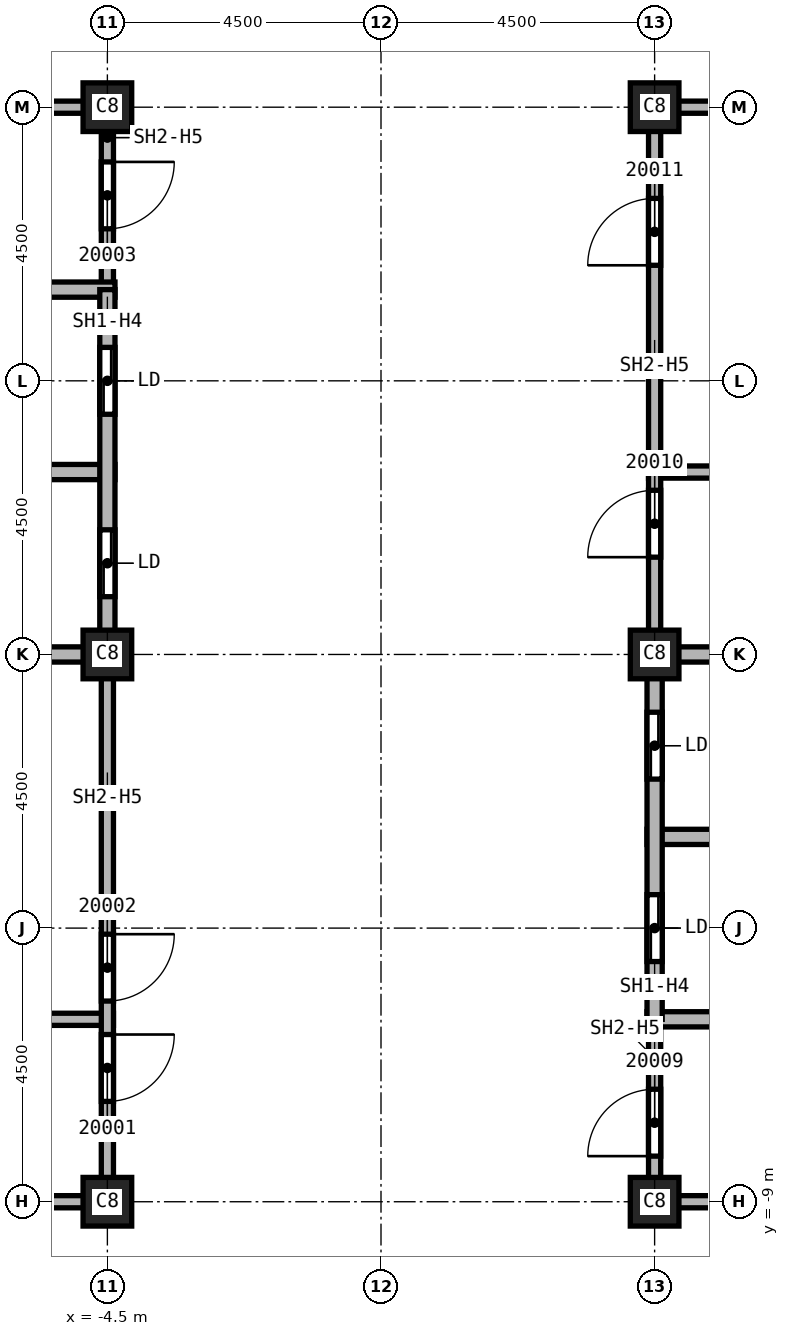
"""IFC4 building model, lengths in metres.
Left out: names, types, materials, properties, quantities, classifications, styles, units other than length and angle.
Written with IfcOpenShell. Run it as: python <this file> out.ifc"""

import sys

from ifc_helpers import new_model, si_unit, direction, frame, frame_2d, origin, origin_2d, place, context, subcontext, project, spatial, rectangle, extrude, element, fill, save


model = new_model("IFC4")
c1 = context("Model", 3, precision=1e-05, world=origin(), true_north=direction((0.0, 1.0)))
c2 = subcontext(c1, "Body", "Model", "MODEL_VIEW")
j1 = project(units=[si_unit("LENGTHUNIT", "METRE"), si_unit("PLANEANGLEUNIT", "RADIAN")], contexts=[c1])
p1 = place(None, origin())
s1 = spatial("IfcSite", under=j1, at=p1, CompositionType="ELEMENT")
p2 = place(p1, origin())
s2 = spatial("IfcBuilding", under=s1, at=p2, CompositionType="ELEMENT")
p3 = place(p2, frame((0.0, 0.0, 290.0)))
s3 = spatial("IfcBuildingStorey", under=s2, at=p3, CompositionType="ELEMENT", Elevation=290.0)
for number, where, z_axis, x_axis in (
    (1, (4.5, 0.0, 0.0), (0.0, 0.0, 1.0), (1.0, 0.0, 0.0)),
    (2, (4.5, 9.0, 0.0), (0.0, 0.0, 1.0), (1.0, 0.0, 0.0)),
    (3, (4.5, -9.0, 0.0), (0.0, 0.0, 1.0), (1.0, 0.0, 0.0)),
    (4, (-4.5, 0.0, 0.0), (0.0, 0.0, 1.0), (1.0, 0.0, 0.0)),
    (5, (-4.5, 9.0, 0.0), (0.0, 0.0, 1.0), (1.0, 0.0, 0.0)),
    (6, (-4.5, -9.0, 0.0), (0.0, 0.0, 1.0), (1.0, 0.0, 0.0)),
):
    element("IfcColumn", number, at=place(p3, frame(where, z_axis=z_axis, x_axis=x_axis)), inside=s3, PredefinedType="COLUMN", context=c2, shape_type="SweptSolid", body=[
        extrude(rectangle(XDim=0.8, YDim=0.8, at=origin_2d()), origin(), (0.0, 0.0, 1.0), 3.59),
    ])
p4 = place(p3, frame((-7.6, -6.0, 0.0), z_axis=(0.0, 0.0, 1.0), x_axis=(1.0, 0.0, 0.0)))
e7 = element("IfcWall", 7, at=p4, inside=s3, PredefinedType="SOLIDWALL", context=c2, shape_type="SweptSolid", body=[
    extrude(rectangle(XDim=3.2, YDim=0.2, at=frame_2d((1.6, 0.0))), origin(), (0.0, 0.0, 1.0), 3.59),
])
for number, where, z_axis, x_axis in (
    (8, (-7.5, 9.0, 0.0), (0.0, 0.0, 1.0), (1.0, 0.0, 0.0)),
    (9, (-4.5, -9.0, 0.0), (0.0, 0.0, 1.0), (-1.0, 0.0, 0.0)),
):
    element("IfcWall", number, at=place(p3, frame(where, z_axis=z_axis, x_axis=x_axis)), inside=s3, PredefinedType="SOLIDWALL", context=c2, shape_type="SweptSolid", body=[
        extrude(rectangle(XDim=3.0, YDim=0.2, at=frame_2d((1.5, 0.0))), origin(), (0.0, 0.0, 1.0), 2.828),
    ])
p5 = place(p3, frame((-4.5, 0.0, 0.0), z_axis=(0.0, 0.0, 1.0), x_axis=(0.0, -1.0, 0.0)))
e10 = element("IfcWall", 10, at=p5, inside=s3, PredefinedType="SOLIDWALL", context=c2, shape_type="SweptSolid", body=[
    extrude(rectangle(XDim=9.1, YDim=0.2, at=frame_2d((4.55, 0.0))), origin(), (0.0, 0.0, 1.0), 2.828),
])
p6 = place(p5, frame((6.25, 0.0, 0.0)))
e11 = element("IfcOpeningElement", 11, at=p6, cuts=e10, PredefinedType="OPENING", context=c2, shape_type="SweptSolid", body=[
    extrude(rectangle(XDim=1.1, YDim=2.1, at=frame_2d((0.55, 1.05))), frame((0.0, 0.1, 0.0), z_axis=(0.0, -1.0, 0.0), x_axis=(1.0, 0.0, 0.0)), (0.0, 0.0, 1.0), 0.2),
])
p7 = place(p5, frame((4.6, 0.0, 0.0)))
e12 = element("IfcOpeningElement", 12, at=p7, cuts=e10, PredefinedType="OPENING", context=c2, shape_type="SweptSolid", body=[
    extrude(rectangle(XDim=1.1, YDim=2.1, at=frame_2d((0.55, 1.05))), frame((0.0, 0.1, 0.0), z_axis=(0.0, -1.0, 0.0), x_axis=(1.0, 0.0, 0.0)), (0.0, 0.0, 1.0), 0.2),
])
p8 = place(p3, frame((-4.5, 9.1, 0.0), z_axis=(0.0, 0.0, 1.0), x_axis=(0.0, -1.0, 0.0)))
e13 = element("IfcWall", 13, at=p8, inside=s3, PredefinedType="SOLIDWALL", context=c2, shape_type="SweptSolid", body=[
    extrude(rectangle(XDim=3.1, YDim=0.2, at=frame_2d((1.55, 0.0))), origin(), (0.0, 0.0, 1.0), 2.828),
])
p9 = place(p8, frame((1.0, 0.0, 0.0)))
e14 = element("IfcOpeningElement", 14, at=p9, cuts=e13, PredefinedType="OPENING", context=c2, shape_type="SweptSolid", body=[
    extrude(rectangle(XDim=1.1, YDim=2.1, at=frame_2d((0.55, 1.05))), frame((0.0, 0.1, 0.0), z_axis=(0.0, -1.0, 0.0), x_axis=(1.0, 0.0, 0.0)), (0.0, 0.0, 1.0), 0.2),
])
p10 = place(p3, frame((4.4, 3.0, 0.0), z_axis=(0.0, 0.0, 1.0), x_axis=(1.0, 0.0, 0.0)))
e15 = element("IfcWall", 15, at=p10, inside=s3, PredefinedType="SOLIDWALL", context=c2, shape_type="SweptSolid", body=[
    extrude(rectangle(XDim=3.225, YDim=0.2, at=frame_2d((1.613, 0.0))), origin(), (0.0, 0.0, 1.0), 3.59),
])
p11 = place(p3, frame((4.5, -9.1, 0.0), z_axis=(0.0, 0.0, 1.0), x_axis=(0.0, 1.0, 0.0)))
e16 = element("IfcWall", 16, at=p11, inside=s3, PredefinedType="SOLIDWALL", context=c2, shape_type="SweptSolid", body=[
    extrude(rectangle(XDim=3.1, YDim=0.2, at=frame_2d((1.55, 0.0))), origin(), (0.0, 0.0, 1.0), 2.828),
])
p12 = place(p11, frame((0.85, 0.0, 0.0)))
e17 = element("IfcOpeningElement", 17, at=p12, cuts=e16, PredefinedType="OPENING", context=c2, shape_type="SweptSolid", body=[
    extrude(rectangle(XDim=1.1, YDim=2.1, at=frame_2d((0.55, 1.05))), frame((0.0, 0.1, 0.0), z_axis=(0.0, -1.0, 0.0), x_axis=(1.0, 0.0, 0.0)), (0.0, 0.0, 1.0), 0.2),
])
p13 = place(p3, frame((4.5, 0.0, 0.0), z_axis=(0.0, 0.0, 1.0), x_axis=(0.0, 1.0, 0.0)))
e18 = element("IfcWall", 18, at=p13, inside=s3, PredefinedType="SOLIDWALL", context=c2, shape_type="SweptSolid", body=[
    extrude(rectangle(XDim=9.1, YDim=0.2, at=frame_2d((4.55, 0.0))), origin(), (0.0, 0.0, 1.0), 2.828),
])
p14 = place(p13, frame((1.6, 0.0, 0.0)))
e19 = element("IfcOpeningElement", 19, at=p14, cuts=e18, PredefinedType="OPENING", context=c2, shape_type="SweptSolid", body=[
    extrude(rectangle(XDim=1.1, YDim=2.1, at=frame_2d((0.55, 1.05))), frame((0.0, 0.1, 0.0), z_axis=(0.0, -1.0, 0.0), x_axis=(1.0, 0.0, 0.0)), (0.0, 0.0, 1.0), 0.2),
])
p15 = place(p13, frame((6.4, 0.0, 0.0)))
e20 = element("IfcOpeningElement", 20, at=p15, cuts=e18, PredefinedType="OPENING", context=c2, shape_type="SweptSolid", body=[
    extrude(rectangle(XDim=1.1, YDim=2.1, at=frame_2d((0.55, 1.05))), frame((0.0, 0.1, 0.0), z_axis=(0.0, -1.0, 0.0), x_axis=(1.0, 0.0, 0.0)), (0.0, 0.0, 1.0), 0.2),
])
for number, where, z_axis, x_axis in (
    (21, (4.5, 9.0, 0.0), (0.0, 0.0, 1.0), (1.0, 0.0, 0.0)),
    (22, (7.5, -9.0, 0.0), (0.0, 0.0, 1.0), (-1.0, 0.0, 0.0)),
):
    element("IfcWall", number, at=place(p3, frame(where, z_axis=z_axis, x_axis=x_axis)), inside=s3, PredefinedType="SOLIDWALL", context=c2, shape_type="SweptSolid", body=[
        extrude(rectangle(XDim=3.0, YDim=0.2, at=frame_2d((1.5, 0.0))), origin(), (0.0, 0.0, 1.0), 2.828),
    ])
p16 = place(p3, frame((-13.625, 3.0, 0.0), z_axis=(0.0, 0.0, 1.0), x_axis=(1.0, 0.0, 0.0)))
e23 = element("IfcWall", 23, at=p16, inside=s3, PredefinedType="SOLIDWALL", context=c2, shape_type="SweptSolid", body=[
    extrude(rectangle(XDim=9.25, YDim=0.25, at=frame_2d((4.625, 0.0))), origin(), (0.0, 0.0, 1.0), 3.59),
])
p17 = place(p16, frame((3.25, 0.0, 0.0)))
e24 = element("IfcOpeningElement", 24, at=p17, cuts=e23, PredefinedType="OPENING", context=c2, shape_type="SweptSolid", body=[
    extrude(rectangle(XDim=1.1, YDim=2.1, at=frame_2d((0.55, 1.05))), frame((0.0, 0.125, 0.0), z_axis=(0.0, -1.0, 0.0), x_axis=(1.0, 0.0, 0.0)), (0.0, 0.0, 1.0), 0.25),
])
for number, where, z_axis, x_axis in (
    (25, (-7.625, 0.0, 0.0), (0.0, 0.0, 1.0), (1.0, 0.0, 0.0)),
    (26, (-7.625, 6.0, 0.0), (0.0, 0.0, 1.0), (1.0, 0.0, 0.0)),
):
    element("IfcWall", number, at=place(p3, frame(where, z_axis=z_axis, x_axis=x_axis)), inside=s3, PredefinedType="SOLIDWALL", context=c2, shape_type="SweptSolid", body=[
        extrude(rectangle(XDim=3.25, YDim=0.25, at=frame_2d((1.625, 0.0))), origin(), (0.0, 0.0, 1.0), 3.59),
    ])
p18 = place(p3, frame((-4.5, 6.0, 0.0), z_axis=(0.0, 0.0, 1.0), x_axis=(0.0, -1.0, 0.0)))
e27 = element("IfcWall", 27, at=p18, inside=s3, PredefinedType="SOLIDWALL", context=c2, shape_type="SweptSolid", body=[
    extrude(rectangle(XDim=6.0, YDim=0.25, at=frame_2d((3.0, 0.0))), origin(), (0.0, 0.0, 1.0), 2.828),
])
p19 = place(p18, frame((3.95, 0.0, 0.0)))
e28 = element("IfcOpeningElement", 28, at=p19, cuts=e27, PredefinedType="OPENING", context=c2, shape_type="SweptSolid", body=[
    extrude(rectangle(XDim=1.1, YDim=2.1, at=frame_2d((0.55, 1.05))), frame((0.0, 0.125, 0.0), z_axis=(0.0, -1.0, 0.0), x_axis=(1.0, 0.0, 0.0)), (0.0, 0.0, 1.0), 0.25),
])
p20 = place(p18, frame((0.95, 0.0, 0.0)))
e29 = element("IfcOpeningElement", 29, at=p20, cuts=e27, PredefinedType="OPENING", context=c2, shape_type="SweptSolid", body=[
    extrude(rectangle(XDim=1.1, YDim=2.1, at=frame_2d((0.55, 1.05))), frame((0.0, 0.125, 0.0), z_axis=(0.0, -1.0, 0.0), x_axis=(1.0, 0.0, 0.0)), (0.0, 0.0, 1.0), 0.25),
])
p21 = place(p3, frame((4.375, -6.0, 0.0), z_axis=(0.0, 0.0, 1.0), x_axis=(1.0, 0.0, 0.0)))
e30 = element("IfcWall", 30, at=p21, inside=s3, PredefinedType="SOLIDWALL", context=c2, shape_type="SweptSolid", body=[
    extrude(rectangle(XDim=3.25, YDim=0.25, at=frame_2d((1.625, 0.0))), origin(), (0.0, 0.0, 1.0), 3.59),
])
p22 = place(p3, frame((4.375, -3.0, 0.0), z_axis=(0.0, 0.0, 1.0), x_axis=(1.0, 0.0, 0.0)))
e31 = element("IfcWall", 31, at=p22, inside=s3, PredefinedType="SOLIDWALL", context=c2, shape_type="SweptSolid", body=[
    extrude(rectangle(XDim=9.25, YDim=0.25, at=frame_2d((4.625, 0.0))), origin(), (0.0, 0.0, 1.0), 3.59),
])
p23 = place(p22, frame((3.375, 0.0, 0.0)))
e32 = element("IfcOpeningElement", 32, at=p23, cuts=e31, PredefinedType="OPENING", context=c2, shape_type="SweptSolid", body=[
    extrude(rectangle(XDim=1.1, YDim=2.1, at=frame_2d((0.55, 1.05))), frame((0.0, 0.125, 0.0), z_axis=(0.0, -1.0, 0.0), x_axis=(1.0, 0.0, 0.0)), (0.0, 0.0, 1.0), 0.25),
])
p24 = place(p3, frame((4.375, 0.0, 0.0), z_axis=(0.0, 0.0, 1.0), x_axis=(1.0, 0.0, 0.0)))
e33 = element("IfcWall", 33, at=p24, inside=s3, PredefinedType="SOLIDWALL", context=c2, shape_type="SweptSolid", body=[
    extrude(rectangle(XDim=3.25, YDim=0.25, at=frame_2d((1.625, 0.0))), origin(), (0.0, 0.0, 1.0), 3.59),
])
p25 = place(p3, frame((4.5, -6.0, 0.0), z_axis=(0.0, 0.0, 1.0), x_axis=(0.0, 1.0, 0.0)))
e34 = element("IfcWall", 34, at=p25, inside=s3, PredefinedType="SOLIDWALL", context=c2, shape_type="SweptSolid", body=[
    extrude(rectangle(XDim=6.0, YDim=0.25, at=frame_2d((3.0, 0.0))), origin(), (0.0, 0.0, 1.0), 2.828),
])
p26 = place(p25, frame((0.95, 0.0, 0.0)))
e35 = element("IfcOpeningElement", 35, at=p26, cuts=e34, PredefinedType="OPENING", context=c2, shape_type="SweptSolid", body=[
    extrude(rectangle(XDim=1.1, YDim=2.1, at=frame_2d((0.55, 1.05))), frame((0.0, 0.125, 0.0), z_axis=(0.0, -1.0, 0.0), x_axis=(1.0, 0.0, 0.0)), (0.0, 0.0, 1.0), 0.25),
])
p27 = place(p25, frame((3.95, 0.0, 0.0)))
e36 = element("IfcOpeningElement", 36, at=p27, cuts=e34, PredefinedType="OPENING", context=c2, shape_type="SweptSolid", body=[
    extrude(rectangle(XDim=1.1, YDim=2.1, at=frame_2d((0.55, 1.05))), frame((0.0, 0.125, 0.0), z_axis=(0.0, -1.0, 0.0), x_axis=(1.0, 0.0, 0.0)), (0.0, 0.0, 1.0), 0.25),
])
p28 = place(p6, origin())
e37 = element("IfcDoor", 37, at=p28, inside=s3, OperationType="SINGLE_SWING_RIGHT", PredefinedType="DOOR", context=c2, shape_type="SweptSolid", body=[
    extrude(rectangle(XDim=1.1, YDim=2.1, at=frame_2d((0.55, 1.05))), frame((0.0, 0.025, 0.0), z_axis=(0.0, -1.0, 0.0), x_axis=(1.0, 0.0, 0.0)), (0.0, 0.0, 1.0), 0.05),
])
fill(e11, e37)
p29 = place(p7, origin())
e38 = element("IfcDoor", 38, at=p29, inside=s3, OperationType="SINGLE_SWING_LEFT", PredefinedType="DOOR", context=c2, shape_type="SweptSolid", body=[
    extrude(rectangle(XDim=1.1, YDim=2.1, at=frame_2d((0.55, 1.05))), frame((0.0, 0.025, 0.0), z_axis=(0.0, -1.0, 0.0), x_axis=(1.0, 0.0, 0.0)), (0.0, 0.0, 1.0), 0.05),
])
fill(e12, e38)
p30 = place(p9, origin())
e39 = element("IfcDoor", 39, at=p30, inside=s3, OperationType="SINGLE_SWING_RIGHT", PredefinedType="DOOR", context=c2, shape_type="SweptSolid", body=[
    extrude(rectangle(XDim=1.1, YDim=2.1, at=frame_2d((0.55, 1.05))), frame((0.0, 0.025, 0.0), z_axis=(0.0, -1.0, 0.0), x_axis=(1.0, 0.0, 0.0)), (0.0, 0.0, 1.0), 0.05),
])
fill(e14, e39)
p31 = place(p12, origin())
e40 = element("IfcDoor", 40, at=p31, inside=s3, OperationType="SINGLE_SWING_RIGHT", PredefinedType="DOOR", context=c2, shape_type="SweptSolid", body=[
    extrude(rectangle(XDim=1.1, YDim=2.1, at=frame_2d((0.55, 1.05))), frame((0.0, 0.025, 0.0), z_axis=(0.0, -1.0, 0.0), x_axis=(1.0, 0.0, 0.0)), (0.0, 0.0, 1.0), 0.05),
])
fill(e17, e40)
p32 = place(p14, origin())
e41 = element("IfcDoor", 41, at=p32, inside=s3, OperationType="SINGLE_SWING_LEFT", PredefinedType="DOOR", context=c2, shape_type="SweptSolid", body=[
    extrude(rectangle(XDim=1.1, YDim=2.1, at=frame_2d((0.55, 1.05))), frame((0.0, 0.025, 0.0), z_axis=(0.0, -1.0, 0.0), x_axis=(1.0, 0.0, 0.0)), (0.0, 0.0, 1.0), 0.05),
])
fill(e19, e41)
p33 = place(p15, origin())
e42 = element("IfcDoor", 42, at=p33, inside=s3, OperationType="SINGLE_SWING_RIGHT", PredefinedType="DOOR", context=c2, shape_type="SweptSolid", body=[
    extrude(rectangle(XDim=1.1, YDim=2.1, at=frame_2d((0.55, 1.05))), frame((0.0, 0.025, 0.0), z_axis=(0.0, -1.0, 0.0), x_axis=(1.0, 0.0, 0.0)), (0.0, 0.0, 1.0), 0.05),
])
fill(e20, e42)
p34 = place(p19, origin())
e43 = element("IfcDoor", 43, at=p34, inside=s3, OperationType="SLIDING_TO_LEFT", PredefinedType="DOOR", context=c2, shape_type="SweptSolid", body=[
    extrude(rectangle(XDim=1.1, YDim=2.1, at=frame_2d((0.55, 1.05))), frame((0.0, 0.025, 0.0), z_axis=(0.0, -1.0, 0.0), x_axis=(1.0, 0.0, 0.0)), (0.0, 0.0, 1.0), 0.05),
])
fill(e28, e43)
p35 = place(p20, origin())
e44 = element("IfcDoor", 44, at=p35, inside=s3, OperationType="SLIDING_TO_LEFT", PredefinedType="DOOR", context=c2, shape_type="SweptSolid", body=[
    extrude(rectangle(XDim=1.1, YDim=2.1, at=frame_2d((0.55, 1.05))), frame((0.0, 0.025, 0.0), z_axis=(0.0, -1.0, 0.0), x_axis=(1.0, 0.0, 0.0)), (0.0, 0.0, 1.0), 0.05),
])
fill(e29, e44)
p36 = place(p26, origin())
e45 = element("IfcDoor", 45, at=p36, inside=s3, OperationType="SLIDING_TO_LEFT", PredefinedType="DOOR", context=c2, shape_type="SweptSolid", body=[
    extrude(rectangle(XDim=1.1, YDim=2.1, at=frame_2d((0.55, 1.05))), frame((0.0, 0.025, 0.0), z_axis=(0.0, -1.0, 0.0), x_axis=(1.0, 0.0, 0.0)), (0.0, 0.0, 1.0), 0.05),
])
fill(e35, e45)
p37 = place(p27, origin())
e46 = element("IfcDoor", 46, at=p37, inside=s3, OperationType="SLIDING_TO_LEFT", PredefinedType="DOOR", context=c2, shape_type="SweptSolid", body=[
    extrude(rectangle(XDim=1.1, YDim=2.1, at=frame_2d((0.55, 1.05))), frame((0.0, 0.025, 0.0), z_axis=(0.0, -1.0, 0.0), x_axis=(1.0, 0.0, 0.0)), (0.0, 0.0, 1.0), 0.05),
])
fill(e36, e46)
save(model, sys.argv[1])
